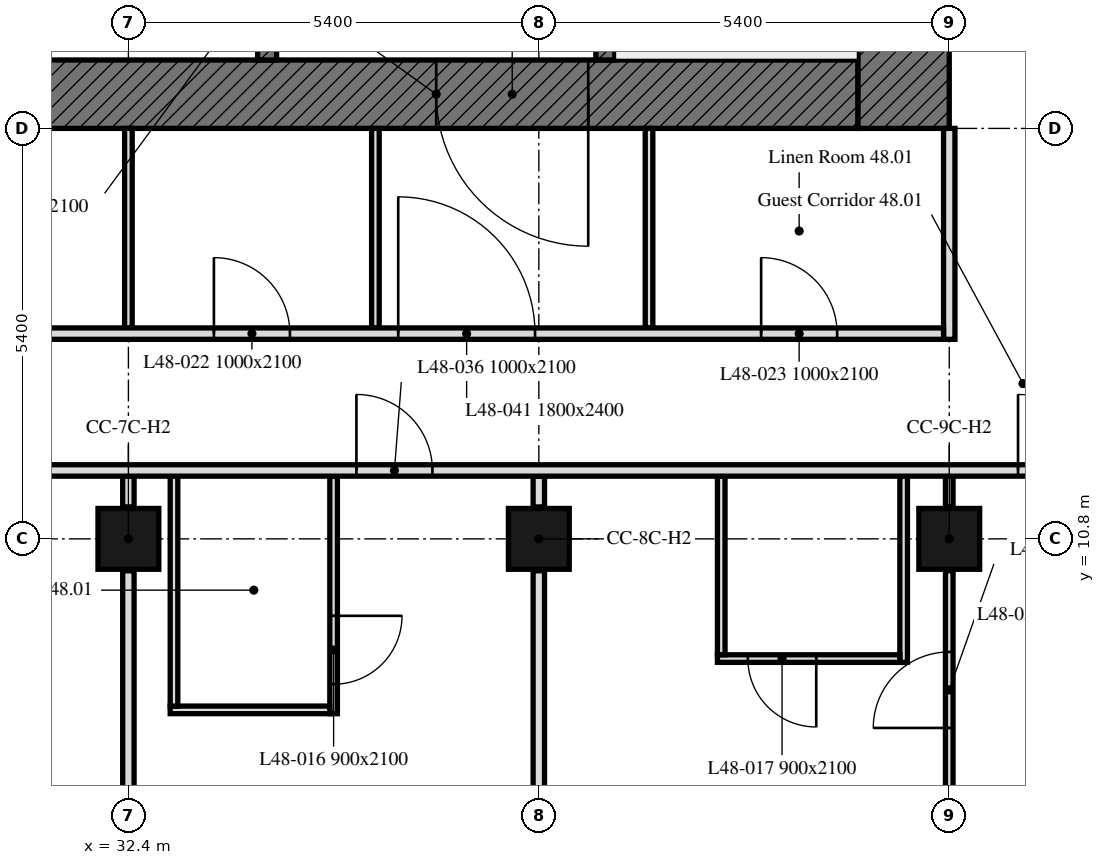
"""IFC4 building model, lengths in metres.
Left out: names, types, materials, properties, quantities, classifications, styles, units other than length and angle.
Written with IfcOpenShell. Run it as: python <this file> out.ifc"""

import sys

from ifc_helpers import new_model, si_unit, direction, frame, frame_2d, origin, origin_2d, place, context, subcontext, project, spatial, rectangle, extrude, element, fill, save


model = new_model("IFC4")
c1 = context("Model", 3, precision=1e-05, world=origin(), true_north=direction((0.0, 1.0)))
c2 = subcontext(c1, "Body", "Model", "MODEL_VIEW")
j1 = project(units=[si_unit("LENGTHUNIT", "METRE"), si_unit("PLANEANGLEUNIT", "RADIAN")], contexts=[c1])
p1 = place(None, origin())
s1 = spatial("IfcSite", under=j1, at=p1, CompositionType="ELEMENT")
p2 = place(p1, origin())
s2 = spatial("IfcBuilding", under=s1, at=p2, CompositionType="ELEMENT")
p3 = place(p2, frame((0.0, 0.0, 197.2)))
s3 = spatial("IfcBuildingStorey", under=s2, at=p3, CompositionType="ELEMENT", Elevation=197.2)
for number, where, z_axis, x_axis in (
    (1, (32.4, 10.8, 0.0), (0.0, 0.0, 1.0), (1.0, 0.0, 0.0)),
    (2, (37.8, 10.8, 0.0), (0.0, 0.0, 1.0), (1.0, 0.0, 0.0)),
    (3, (43.2, 10.8, 0.0), (0.0, 0.0, 1.0), (1.0, 0.0, 0.0)),
):
    element("IfcColumn", number, at=place(p3, frame(where, z_axis=z_axis, x_axis=x_axis)), inside=s3, PredefinedType="COLUMN", context=c2, shape_type="SweptSolid", body=[
        extrude(rectangle(XDim=0.8, YDim=0.8, at=origin_2d()), origin(), (0.0, 0.0, 1.0), 3.0),
    ])
p4 = place(p3, frame((43.051, 6.099, 0.0), z_axis=(0.0, 0.0, 1.0), x_axis=(0.707106781187, 0.707106781187, 0.0)))
e4 = element("IfcWall", 4, at=p4, inside=s3, PredefinedType="SOLIDWALL", context=c2, shape_type="SweptSolid", body=[
    extrude(rectangle(XDim=6.86, YDim=0.3, at=frame_2d((3.43, 0.0))), origin(), (0.0, 0.0, 1.0), 3.0),
])
p5 = place(p4, frame((1.28, 0.0, 0.9)))
e5 = element("IfcOpeningElement", 5, at=p5, cuts=e4, PredefinedType="OPENING", context=c2, shape_type="SweptSolid", body=[
    extrude(rectangle(XDim=1.1, YDim=1.7, at=frame_2d((0.55, 0.85))), frame((0.0, 0.16, 0.0), z_axis=(0.0, -1.0, 0.0), x_axis=(1.0, 0.0, 0.0)), (0.0, 0.0, 1.0), 0.32),
])
p6 = place(p4, frame((4.48, 0.0, 0.9)))
e6 = element("IfcOpeningElement", 6, at=p6, cuts=e4, PredefinedType="OPENING", context=c2, shape_type="SweptSolid", body=[
    extrude(rectangle(XDim=1.1, YDim=1.7, at=frame_2d((0.55, 0.85))), frame((0.0, 0.16, 0.0), z_axis=(0.0, -1.0, 0.0), x_axis=(1.0, 0.0, 0.0)), (0.0, 0.0, 1.0), 0.32),
])
p7 = place(p3, frame((42.0, 16.65, 0.0), z_axis=(0.0, 0.0, 1.0), x_axis=(-1.0, 0.0, 0.0)))
e7 = element("IfcWall", 7, at=p7, inside=s3, PredefinedType="SOLIDWALL", context=c2, shape_type="SweptSolid", body=[
    extrude(rectangle(XDim=11.1, YDim=0.9, at=frame_2d((5.55, 0.0))), origin(), (0.0, 0.0, 1.0), 3.0),
])
p8 = place(p7, frame((3.55, 0.0, 0.0)))
e8 = element("IfcOpeningElement", 8, at=p8, cuts=e7, PredefinedType="OPENING", context=c2, shape_type="SweptSolid", body=[
    extrude(rectangle(XDim=2.0, YDim=2.4, at=frame_2d((1.0, 1.2))), frame((0.0, 0.45, 0.0), z_axis=(0.0, -1.0, 0.0), x_axis=(1.0, 0.0, 0.0)), (0.0, 0.0, 1.0), 0.9),
])
p9 = place(p3, frame((42.6, 32.4, 0.0), z_axis=(0.0, 0.0, 1.0), x_axis=(0.0, -1.0, 0.0)))
e9 = element("IfcWall", 9, at=p9, inside=s3, PredefinedType="SOLIDWALL", context=c2, shape_type="SweptSolid", body=[
    extrude(rectangle(XDim=16.2, YDim=1.2, at=frame_2d((8.1, 0.0))), origin(), (0.0, 0.0, 1.0), 3.0),
])
p10 = place(p3, frame((38.675, 17.1, 0.0), z_axis=(0.0, 0.0, 1.0), x_axis=(0.0, 1.0, 0.0)))
e10 = element("IfcWall", 10, at=p10, inside=s3, PredefinedType="SOLIDWALL", context=c2, shape_type="SweptSolid", body=[
    extrude(rectangle(XDim=14.4, YDim=0.25, at=frame_2d((7.2, 0.0))), origin(), (0.0, 0.0, 1.0), 3.0),
])
p11 = place(p10, frame((4.6, 0.0, 0.0)))
e11 = element("IfcOpeningElement", 11, at=p11, cuts=e10, PredefinedType="OPENING", context=c2, shape_type="SweptSolid", body=[
    extrude(rectangle(XDim=1.0, YDim=2.1, at=frame_2d((0.5, 1.05))), frame((0.0, 0.125, 0.0), z_axis=(0.0, -1.0, 0.0), x_axis=(1.0, 0.0, 0.0)), (0.0, 0.0, 1.0), 0.25),
])
p12 = place(p10, frame((7.062, 0.0, 0.0)))
e12 = element("IfcOpeningElement", 12, at=p12, cuts=e10, PredefinedType="OPENING", context=c2, shape_type="SweptSolid", body=[
    extrude(rectangle(XDim=1.2, YDim=2.1, at=frame_2d((0.6, 1.05))), frame((0.0, 0.125, 0.0), z_axis=(0.0, -1.0, 0.0), x_axis=(1.0, 0.0, 0.0)), (0.0, 0.0, 1.0), 0.25),
])
p13 = place(p10, frame((9.472, 0.0, 0.0)))
e13 = element("IfcOpeningElement", 13, at=p13, cuts=e10, PredefinedType="OPENING", context=c2, shape_type="SweptSolid", body=[
    extrude(rectangle(XDim=0.9, YDim=2.1, at=frame_2d((0.45, 1.05))), frame((0.0, 0.125, 0.0), z_axis=(0.0, -1.0, 0.0), x_axis=(1.0, 0.0, 0.0)), (0.0, 0.0, 1.0), 0.25),
])
p14 = place(p10, frame((11.159, 0.0, 0.0)))
e14 = element("IfcOpeningElement", 14, at=p14, cuts=e10, PredefinedType="OPENING", context=c2, shape_type="SweptSolid", body=[
    extrude(rectangle(XDim=0.9, YDim=2.1, at=frame_2d((0.45, 1.05))), frame((0.0, 0.125, 0.0), z_axis=(0.0, -1.0, 0.0), x_axis=(1.0, 0.0, 0.0)), (0.0, 0.0, 1.0), 0.25),
])
p15 = place(p10, frame((13.1, 0.0, 0.0)))
e15 = element("IfcOpeningElement", 15, at=p15, cuts=e10, PredefinedType="OPENING", context=c2, shape_type="SweptSolid", body=[
    extrude(rectangle(XDim=0.9, YDim=2.1, at=frame_2d((0.45, 1.05))), frame((0.0, 0.125, 0.0), z_axis=(0.0, -1.0, 0.0), x_axis=(1.0, 0.0, 0.0)), (0.0, 0.0, 1.0), 0.25),
])
p16 = place(p3, frame((34.225, 17.1, 0.0), z_axis=(0.0, 0.0, 1.0), x_axis=(0.0, 1.0, 0.0)))
e16 = element("IfcWall", 16, at=p16, inside=s3, PredefinedType="SOLIDWALL", context=c2, shape_type="SweptSolid", body=[
    extrude(rectangle(XDim=14.4, YDim=0.25, at=frame_2d((7.2, 0.0))), origin(), (0.0, 0.0, 1.0), 3.0),
])
p17 = place(p16, frame((13.15, 0.0, 0.0)))
e17 = element("IfcOpeningElement", 17, at=p17, cuts=e16, PredefinedType="OPENING", context=c2, shape_type="SweptSolid", body=[
    extrude(rectangle(XDim=1.0, YDim=2.1, at=frame_2d((0.5, 1.05))), frame((0.0, 0.125, 0.0), z_axis=(0.0, -1.0, 0.0), x_axis=(1.0, 0.0, 0.0)), (0.0, 0.0, 1.0), 0.25),
])
p18 = place(p16, frame((0.6, 0.0, 0.0)))
e18 = element("IfcOpeningElement", 18, at=p18, cuts=e16, PredefinedType="OPENING", context=c2, shape_type="SweptSolid", body=[
    extrude(rectangle(XDim=1.1, YDim=2.1, at=frame_2d((0.55, 1.05))), frame((0.0, 0.125, 0.0), z_axis=(0.0, -1.0, 0.0), x_axis=(1.0, 0.0, 0.0)), (0.0, 0.0, 1.0), 0.25),
])
p19 = place(p16, frame((3.25, 0.0, 0.0)))
e19 = element("IfcOpeningElement", 19, at=p19, cuts=e16, PredefinedType="OPENING", context=c2, shape_type="SweptSolid", body=[
    extrude(rectangle(XDim=0.9, YDim=2.1, at=frame_2d((0.45, 1.05))), frame((0.0, 0.125, 0.0), z_axis=(0.0, -1.0, 0.0), x_axis=(1.0, 0.0, 0.0)), (0.0, 0.0, 1.0), 0.25),
])
p20 = place(p3, frame((32.4, 6.151, 0.0), z_axis=(0.0, 0.0, 1.0), x_axis=(0.0, 1.0, 0.0)))
e20 = element("IfcWall", 20, at=p20, inside=s3, PredefinedType="PARTITIONING", context=c2, shape_type="SweptSolid", body=[
    extrude(rectangle(XDim=4.229, YDim=0.15, at=frame_2d((2.115, 0.0))), origin(), (0.0, 0.0, 1.0), 3.0),
])
p21 = place(p3, frame((32.4, 11.22, 0.0), z_axis=(0.0, 0.0, 1.0), x_axis=(0.0, 1.0, 0.0)))
e21 = element("IfcWall", 21, at=p21, inside=s3, PredefinedType="PARTITIONING", context=c2, shape_type="SweptSolid", body=[
    extrude(rectangle(XDim=0.405, YDim=0.15, at=frame_2d((0.203, 0.0))), origin(), (0.0, 0.0, 1.0), 3.0),
])
p22 = place(p3, frame((37.8, 6.151, 0.0), z_axis=(0.0, 0.0, 1.0), x_axis=(0.0, 1.0, 0.0)))
e22 = element("IfcWall", 22, at=p22, inside=s3, PredefinedType="PARTITIONING", context=c2, shape_type="SweptSolid", body=[
    extrude(rectangle(XDim=4.229, YDim=0.15, at=frame_2d((2.115, 0.0))), origin(), (0.0, 0.0, 1.0), 3.0),
])
p23 = place(p3, frame((37.8, 11.22, 0.0), z_axis=(0.0, 0.0, 1.0), x_axis=(0.0, 1.0, 0.0)))
e23 = element("IfcWall", 23, at=p23, inside=s3, PredefinedType="PARTITIONING", context=c2, shape_type="SweptSolid", body=[
    extrude(rectangle(XDim=0.405, YDim=0.15, at=frame_2d((0.203, 0.0))), origin(), (0.0, 0.0, 1.0), 3.0),
])
p24 = place(p3, frame((35.1, 11.625, 0.0), z_axis=(0.0, 0.0, 1.0), x_axis=(0.0, -1.0, 0.0)))
e24 = element("IfcWall", 24, at=p24, inside=s3, PredefinedType="PARTITIONING", context=c2, shape_type="SweptSolid", body=[
    extrude(rectangle(XDim=3.125, YDim=0.1, at=frame_2d((1.562, 0.0))), origin(), (0.0, 0.0, 1.0), 3.0),
])
p25 = place(p24, frame((1.837, 0.0, 0.0)))
e25 = element("IfcOpeningElement", 25, at=p25, cuts=e24, PredefinedType="OPENING", context=c2, shape_type="SweptSolid", body=[
    extrude(rectangle(XDim=0.9, YDim=2.1, at=frame_2d((0.45, 1.05))), frame((0.0, 0.05, 0.0), z_axis=(0.0, -1.0, 0.0), x_axis=(1.0, 0.0, 0.0)), (0.0, 0.0, 1.0), 0.1),
])
p26 = place(p3, frame((35.05, 8.55, 0.0), z_axis=(0.0, 0.0, 1.0), x_axis=(-1.0, 0.0, 0.0)))
e26 = element("IfcWall", 26, at=p26, inside=s3, PredefinedType="PARTITIONING", context=c2, shape_type="SweptSolid", body=[
    extrude(rectangle(XDim=2.1, YDim=0.1, at=frame_2d((1.05, 0.0))), origin(), (0.0, 0.0, 1.0), 3.0),
])
p27 = place(p3, frame((33.0, 8.6, 0.0), z_axis=(0.0, 0.0, 1.0), x_axis=(0.0, 1.0, 0.0)))
e27 = element("IfcWall", 27, at=p27, inside=s3, PredefinedType="PARTITIONING", context=c2, shape_type="SweptSolid", body=[
    extrude(rectangle(XDim=3.025, YDim=0.1, at=frame_2d((1.512, 0.0))), origin(), (0.0, 0.0, 1.0), 3.0),
])
p28 = place(p3, frame((43.2, 6.512, 0.0), z_axis=(0.0, 0.0, 1.0), x_axis=(0.0, 1.0, 0.0)))
e28 = element("IfcWall", 28, at=p28, inside=s3, PredefinedType="PARTITIONING", context=c2, shape_type="SweptSolid", body=[
    extrude(rectangle(XDim=3.868, YDim=0.1, at=frame_2d((1.934, 0.0))), origin(), (0.0, 0.0, 1.0), 3.0),
])
p29 = place(p28, frame((1.8, 0.0, 0.0)))
e29 = element("IfcOpeningElement", 29, at=p29, cuts=e28, PredefinedType="OPENING", context=c2, shape_type="SweptSolid", body=[
    extrude(rectangle(XDim=1.0, YDim=2.1, at=frame_2d((0.5, 1.05))), frame((0.0, 0.05, 0.0), z_axis=(0.0, -1.0, 0.0), x_axis=(1.0, 0.0, 0.0)), (0.0, 0.0, 1.0), 0.1),
])
p30 = place(p3, frame((43.2, 11.22, 0.0), z_axis=(0.0, 0.0, 1.0), x_axis=(0.0, 1.0, 0.0)))
e30 = element("IfcWall", 30, at=p30, inside=s3, PredefinedType="PARTITIONING", context=c2, shape_type="SweptSolid", body=[
    extrude(rectangle(XDim=0.405, YDim=0.1, at=frame_2d((0.203, 0.0))), origin(), (0.0, 0.0, 1.0), 3.0),
])
p31 = place(p3, frame((42.6, 11.625, 0.0), z_axis=(0.0, 0.0, 1.0), x_axis=(0.0, -1.0, 0.0)))
e31 = element("IfcWall", 31, at=p31, inside=s3, PredefinedType="PARTITIONING", context=c2, shape_type="SweptSolid", body=[
    extrude(rectangle(XDim=2.45, YDim=0.1, at=frame_2d((1.225, 0.0))), origin(), (0.0, 0.0, 1.0), 3.0),
])
p32 = place(p3, frame((42.55, 9.225, 0.0), z_axis=(0.0, 0.0, 1.0), x_axis=(-1.0, 0.0, 0.0)))
e32 = element("IfcWall", 32, at=p32, inside=s3, PredefinedType="PARTITIONING", context=c2, shape_type="SweptSolid", body=[
    extrude(rectangle(XDim=2.4, YDim=0.1, at=frame_2d((1.2, 0.0))), origin(), (0.0, 0.0, 1.0), 3.0),
])
p33 = place(p32, frame((1.1, 0.0, 0.0)))
e33 = element("IfcOpeningElement", 33, at=p33, cuts=e32, PredefinedType="OPENING", context=c2, shape_type="SweptSolid", body=[
    extrude(rectangle(XDim=0.9, YDim=2.1, at=frame_2d((0.45, 1.05))), frame((0.0, 0.05, 0.0), z_axis=(0.0, -1.0, 0.0), x_axis=(1.0, 0.0, 0.0)), (0.0, 0.0, 1.0), 0.1),
])
p34 = place(p3, frame((40.2, 9.275, 0.0), z_axis=(0.0, 0.0, 1.0), x_axis=(0.0, 1.0, 0.0)))
e34 = element("IfcWall", 34, at=p34, inside=s3, PredefinedType="PARTITIONING", context=c2, shape_type="SweptSolid", body=[
    extrude(rectangle(XDim=2.35, YDim=0.1, at=frame_2d((1.175, 0.0))), origin(), (0.0, 0.0, 1.0), 3.0),
])
p35 = place(p3, frame((6.151, 11.7, 0.0), z_axis=(0.0, 0.0, 1.0), x_axis=(1.0, 0.0, 0.0)))
e35 = element("IfcWall", 35, at=p35, inside=s3, PredefinedType="PARTITIONING", context=c2, shape_type="SweptSolid", body=[
    extrude(rectangle(XDim=41.698, YDim=0.15, at=frame_2d((20.849, 0.0))), origin(), (0.0, 0.0, 1.0), 3.0),
])
p36 = place(p35, frame((17.649, 0.0, 0.0)))
e36 = element("IfcOpeningElement", 36, at=p36, cuts=e35, PredefinedType="OPENING", context=c2, shape_type="SweptSolid", body=[
    extrude(rectangle(XDim=1.0, YDim=2.1, at=frame_2d((0.5, 1.05))), frame((0.0, 0.075, 0.0), z_axis=(0.0, -1.0, 0.0), x_axis=(1.0, 0.0, 0.0)), (0.0, 0.0, 1.0), 0.15),
])
p37 = place(p35, frame((1.449, 0.0, 0.0)))
e37 = element("IfcOpeningElement", 37, at=p37, cuts=e35, PredefinedType="OPENING", context=c2, shape_type="SweptSolid", body=[
    extrude(rectangle(XDim=1.0, YDim=2.1, at=frame_2d((0.5, 1.05))), frame((0.0, 0.075, 0.0), z_axis=(0.0, -1.0, 0.0), x_axis=(1.0, 0.0, 0.0)), (0.0, 0.0, 1.0), 0.15),
])
p38 = place(p35, frame((29.249, 0.0, 0.0)))
e38 = element("IfcOpeningElement", 38, at=p38, cuts=e35, PredefinedType="OPENING", context=c2, shape_type="SweptSolid", body=[
    extrude(rectangle(XDim=1.0, YDim=2.1, at=frame_2d((0.5, 1.05))), frame((0.0, 0.075, 0.0), z_axis=(0.0, -1.0, 0.0), x_axis=(1.0, 0.0, 0.0)), (0.0, 0.0, 1.0), 0.15),
])
p39 = place(p35, frame((37.954, 0.0, 0.0)))
e39 = element("IfcOpeningElement", 39, at=p39, cuts=e35, PredefinedType="OPENING", context=c2, shape_type="SweptSolid", body=[
    extrude(rectangle(XDim=1.0, YDim=2.1, at=frame_2d((0.5, 1.05))), frame((0.0, 0.075, 0.0), z_axis=(0.0, -1.0, 0.0), x_axis=(1.0, 0.0, 0.0)), (0.0, 0.0, 1.0), 0.15),
])
for number, where, z_axis, x_axis in (
    (40, (32.4, 13.575, 0.0), (0.0, 0.0, 1.0), (0.0, 1.0, 0.0)),
    (41, (35.65, 16.2, 0.0), (0.0, 0.0, 1.0), (0.0, -1.0, 0.0)),
    (42, (39.25, 13.575, 0.0), (0.0, 0.0, 1.0), (0.0, 1.0, 0.0)),
):
    element("IfcWall", number, at=place(p3, frame(where, z_axis=z_axis, x_axis=x_axis)), inside=s3, PredefinedType="PARTITIONING", context=c2, shape_type="SweptSolid", body=[
        extrude(rectangle(XDim=2.625, YDim=0.1, at=frame_2d((1.312, 0.0))), origin(), (0.0, 0.0, 1.0), 3.0),
    ])
p40 = place(p3, frame((43.2, 16.2, 0.0), z_axis=(0.0, 0.0, 1.0), x_axis=(0.0, -1.0, 0.0)))
e43 = element("IfcWall", 43, at=p40, inside=s3, PredefinedType="PARTITIONING", context=c2, shape_type="SweptSolid", body=[
    extrude(rectangle(XDim=2.775, YDim=0.15, at=frame_2d((1.387, 0.0))), origin(), (0.0, 0.0, 1.0), 3.0),
])
p41 = place(p3, frame((9.45, 13.5, 0.0), z_axis=(0.0, 0.0, 1.0), x_axis=(1.0, 0.0, 0.0)))
e44 = element("IfcWall", 44, at=p41, inside=s3, PredefinedType="PARTITIONING", context=c2, shape_type="SweptSolid", body=[
    extrude(rectangle(XDim=33.675, YDim=0.15, at=frame_2d((16.837, 0.0))), origin(), (0.0, 0.0, 1.0), 3.0),
])
p42 = place(p41, frame((8.95, 0.0, 0.0)))
e45 = element("IfcOpeningElement", 45, at=p42, cuts=e44, PredefinedType="OPENING", context=c2, shape_type="SweptSolid", body=[
    extrude(rectangle(XDim=1.0, YDim=2.1, at=frame_2d((0.5, 1.05))), frame((0.0, 0.075, 0.0), z_axis=(0.0, -1.0, 0.0), x_axis=(1.0, 0.0, 0.0)), (0.0, 0.0, 1.0), 0.15),
])
p43 = place(p41, frame((15.517, 0.0, 0.0)))
e46 = element("IfcOpeningElement", 46, at=p43, cuts=e44, PredefinedType="OPENING", context=c2, shape_type="SweptSolid", body=[
    extrude(rectangle(XDim=1.0, YDim=2.1, at=frame_2d((0.5, 1.05))), frame((0.0, 0.075, 0.0), z_axis=(0.0, -1.0, 0.0), x_axis=(1.0, 0.0, 0.0)), (0.0, 0.0, 1.0), 0.15),
])
p44 = place(p41, frame((24.075, 0.0, 0.0)))
e47 = element("IfcOpeningElement", 47, at=p44, cuts=e44, PredefinedType="OPENING", context=c2, shape_type="SweptSolid", body=[
    extrude(rectangle(XDim=1.0, YDim=2.1, at=frame_2d((0.5, 1.05))), frame((0.0, 0.075, 0.0), z_axis=(0.0, -1.0, 0.0), x_axis=(1.0, 0.0, 0.0)), (0.0, 0.0, 1.0), 0.15),
])
p45 = place(p41, frame((31.275, 0.0, 0.0)))
e48 = element("IfcOpeningElement", 48, at=p45, cuts=e44, PredefinedType="OPENING", context=c2, shape_type="SweptSolid", body=[
    extrude(rectangle(XDim=1.0, YDim=2.1, at=frame_2d((0.5, 1.05))), frame((0.0, 0.075, 0.0), z_axis=(0.0, -1.0, 0.0), x_axis=(1.0, 0.0, 0.0)), (0.0, 0.0, 1.0), 0.15),
])
p46 = place(p41, frame((4.625, 0.0, 0.0)))
e49 = element("IfcOpeningElement", 49, at=p46, cuts=e44, PredefinedType="OPENING", context=c2, shape_type="SweptSolid", body=[
    extrude(rectangle(XDim=1.0, YDim=2.1, at=frame_2d((0.5, 1.05))), frame((0.0, 0.075, 0.0), z_axis=(0.0, -1.0, 0.0), x_axis=(1.0, 0.0, 0.0)), (0.0, 0.0, 1.0), 0.15),
])
p47 = place(p41, frame((1.4, 0.0, 0.0)))
e50 = element("IfcOpeningElement", 50, at=p47, cuts=e44, PredefinedType="OPENING", context=c2, shape_type="SweptSolid", body=[
    extrude(rectangle(XDim=1.8, YDim=2.4, at=frame_2d((0.9, 1.2))), frame((0.0, 0.075, 0.0), z_axis=(0.0, -1.0, 0.0), x_axis=(1.0, 0.0, 0.0)), (0.0, 0.0, 1.0), 0.15),
])
p48 = place(p41, frame((26.5, 0.0, 0.0)))
e51 = element("IfcOpeningElement", 51, at=p48, cuts=e44, PredefinedType="OPENING", context=c2, shape_type="SweptSolid", body=[
    extrude(rectangle(XDim=1.8, YDim=2.4, at=frame_2d((0.9, 1.2))), frame((0.0, 0.075, 0.0), z_axis=(0.0, -1.0, 0.0), x_axis=(1.0, 0.0, 0.0)), (0.0, 0.0, 1.0), 0.15),
])
p49 = place(p5, origin())
e52 = element("IfcWindow", 52, at=p49, inside=s3, PartitioningType="SINGLE_PANEL", PredefinedType="WINDOW", context=c2, shape_type="SweptSolid", body=[
    extrude(rectangle(XDim=1.1, YDim=1.7, at=frame_2d((0.55, 0.85))), frame((0.0, 0.03, 0.0), z_axis=(0.0, -1.0, 0.0), x_axis=(1.0, 0.0, 0.0)), (0.0, 0.0, 1.0), 0.06),
])
fill(e5, e52)
p50 = place(p8, origin())
e53 = element("IfcDoor", 53, at=p50, inside=s3, OperationType="DOUBLE_DOOR_SINGLE_SWING", PredefinedType="DOOR", context=c2, shape_type="SweptSolid", body=[
    extrude(rectangle(XDim=2.0, YDim=2.4, at=frame_2d((1.0, 1.2))), frame((0.0, 0.025, 0.0), z_axis=(0.0, -1.0, 0.0), x_axis=(1.0, 0.0, 0.0)), (0.0, 0.0, 1.0), 0.05),
])
fill(e8, e53)
p51 = place(p25, origin())
e54 = element("IfcDoor", 54, at=p51, inside=s3, OperationType="SINGLE_SWING_LEFT", PredefinedType="DOOR", context=c2, shape_type="SweptSolid", body=[
    extrude(rectangle(XDim=0.9, YDim=2.1, at=frame_2d((0.45, 1.05))), frame((0.0, 0.025, 0.0), z_axis=(0.0, -1.0, 0.0), x_axis=(1.0, 0.0, 0.0)), (0.0, 0.0, 1.0), 0.05),
])
fill(e25, e54)
p52 = place(p33, origin())
e55 = element("IfcDoor", 55, at=p52, inside=s3, OperationType="SINGLE_SWING_LEFT", PredefinedType="DOOR", context=c2, shape_type="SweptSolid", body=[
    extrude(rectangle(XDim=0.9, YDim=2.1, at=frame_2d((0.45, 1.05))), frame((0.0, 0.025, 0.0), z_axis=(0.0, -1.0, 0.0), x_axis=(1.0, 0.0, 0.0)), (0.0, 0.0, 1.0), 0.05),
])
fill(e33, e55)
p53 = place(p44, origin())
e56 = element("IfcDoor", 56, at=p53, inside=s3, OperationType="SINGLE_SWING_RIGHT", PredefinedType="DOOR", context=c2, shape_type="SweptSolid", body=[
    extrude(rectangle(XDim=1.0, YDim=2.1, at=frame_2d((0.5, 1.05))), frame((0.0, 0.025, 0.0), z_axis=(0.0, -1.0, 0.0), x_axis=(1.0, 0.0, 0.0)), (0.0, 0.0, 1.0), 0.05),
])
fill(e47, e56)
p54 = place(p45, origin())
e57 = element("IfcDoor", 57, at=p54, inside=s3, OperationType="SINGLE_SWING_LEFT", PredefinedType="DOOR", context=c2, shape_type="SweptSolid", body=[
    extrude(rectangle(XDim=1.0, YDim=2.1, at=frame_2d((0.5, 1.05))), frame((0.0, 0.025, 0.0), z_axis=(0.0, -1.0, 0.0), x_axis=(1.0, 0.0, 0.0)), (0.0, 0.0, 1.0), 0.05),
])
fill(e48, e57)
p55 = place(p38, origin())
e58 = element("IfcDoor", 58, at=p55, inside=s3, OperationType="SINGLE_SWING_LEFT", PredefinedType="DOOR", context=c2, shape_type="SweptSolid", body=[
    extrude(rectangle(XDim=1.0, YDim=2.1, at=frame_2d((0.5, 1.05))), frame((0.0, 0.025, 0.0), z_axis=(0.0, -1.0, 0.0), x_axis=(1.0, 0.0, 0.0)), (0.0, 0.0, 1.0), 0.05),
])
fill(e38, e58)
p56 = place(p29, origin())
e59 = element("IfcDoor", 59, at=p56, inside=s3, OperationType="SINGLE_SWING_LEFT", PredefinedType="DOOR", context=c2, shape_type="SweptSolid", body=[
    extrude(rectangle(XDim=1.0, YDim=2.1, at=frame_2d((0.5, 1.05))), frame((0.0, 0.025, 0.0), z_axis=(0.0, -1.0, 0.0), x_axis=(1.0, 0.0, 0.0)), (0.0, 0.0, 1.0), 0.05),
])
fill(e29, e59)
p57 = place(p39, origin())
e60 = element("IfcDoor", 60, at=p57, inside=s3, OperationType="SINGLE_SWING_LEFT", PredefinedType="DOOR", context=c2, shape_type="SweptSolid", body=[
    extrude(rectangle(XDim=1.0, YDim=2.1, at=frame_2d((0.5, 1.05))), frame((0.0, 0.025, 0.0), z_axis=(0.0, -1.0, 0.0), x_axis=(1.0, 0.0, 0.0)), (0.0, 0.0, 1.0), 0.05),
])
fill(e39, e60)
p58 = place(p48, origin())
e61 = element("IfcDoor", 61, at=p58, inside=s3, OperationType="DOUBLE_DOOR_SINGLE_SWING", PredefinedType="DOOR", context=c2, shape_type="SweptSolid", body=[
    extrude(rectangle(XDim=1.8, YDim=2.4, at=frame_2d((0.9, 1.2))), frame((0.0, 0.025, 0.0), z_axis=(0.0, -1.0, 0.0), x_axis=(1.0, 0.0, 0.0)), (0.0, 0.0, 1.0), 0.05),
])
fill(e51, e61)
save(model, sys.argv[1])
